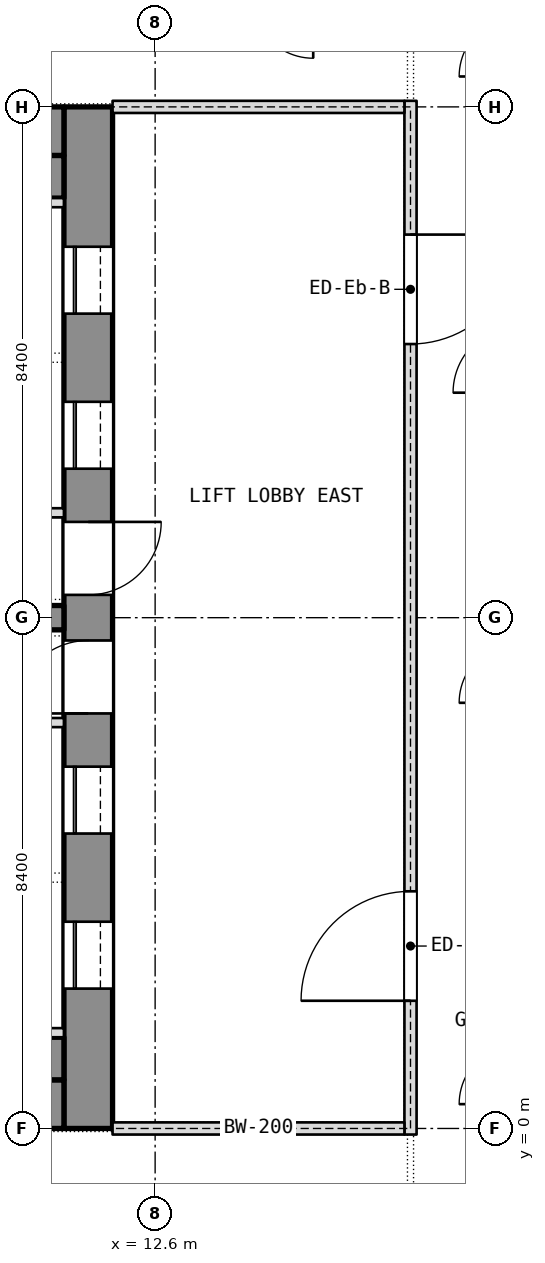
"""IFC4 building model, lengths in metres.
Left out: names, types, materials, properties, quantities, classifications, styles, units other than length and angle.
Written with IfcOpenShell. Run it as: python <this file> out.ifc"""

import sys

from ifc_helpers import new_model, si_unit, direction, frame, frame_2d, origin, place, context, subcontext, project, spatial, rectangle, extrude, element, fill, save


model = new_model("IFC4")
c1 = context("Model", 3, precision=1e-05, world=origin(), true_north=direction((0.0, 1.0)))
c2 = subcontext(c1, "Body", "Model", "MODEL_VIEW")
j1 = project(units=[si_unit("LENGTHUNIT", "METRE"), si_unit("PLANEANGLEUNIT", "RADIAN")], contexts=[c1])
p1 = place(None, origin())
s1 = spatial("IfcSite", under=j1, at=p1, CompositionType="ELEMENT")
p2 = place(p1, origin())
s2 = spatial("IfcBuilding", under=s1, at=p2, CompositionType="ELEMENT")
p3 = place(p2, frame((0.0, 0.0, 248.9)))
s3 = spatial("IfcBuildingStorey", under=s2, at=p3, CompositionType="ELEMENT", Elevation=248.9)
p4 = place(p3, frame((11.5, 0.0, 0.0), z_axis=(0.0, 0.0, 1.0), x_axis=(0.0, 1.0, 0.0)))
e1 = element("IfcWall", 1, at=p4, inside=s3, PredefinedType="SHEAR", context=c2, shape_type="SweptSolid", body=[
    extrude(rectangle(XDim=16.8, YDim=0.8, at=frame_2d((8.4, 0.0))), origin(), (0.0, 0.0, 1.0), 3.6),
])
p5 = place(p4, frame((2.3, 0.0, 0.0)))
e2 = element("IfcOpeningElement", 2, at=p5, cuts=e1, PredefinedType="OPENING", context=c2, shape_type="SweptSolid", body=[
    extrude(rectangle(XDim=1.1, YDim=2.1, at=frame_2d((0.55, 1.05))), frame((0.0, 0.4, 0.0), z_axis=(0.0, -1.0, 0.0), x_axis=(1.0, 0.0, 0.0)), (0.0, 0.0, 1.0), 0.8),
])
p6 = place(p4, frame((4.85, 0.0, 0.0)))
e3 = element("IfcOpeningElement", 3, at=p6, cuts=e1, PredefinedType="OPENING", context=c2, shape_type="SweptSolid", body=[
    extrude(rectangle(XDim=1.1, YDim=2.1, at=frame_2d((0.55, 1.05))), frame((0.0, 0.4, 0.0), z_axis=(0.0, -1.0, 0.0), x_axis=(1.0, 0.0, 0.0)), (0.0, 0.0, 1.0), 0.8),
])
p7 = place(p4, frame((6.825, 0.0, 0.0)))
e4 = element("IfcOpeningElement", 4, at=p7, cuts=e1, PredefinedType="OPENING", context=c2, shape_type="SweptSolid", body=[
    extrude(rectangle(XDim=1.2, YDim=2.1, at=frame_2d((0.6, 1.05))), frame((0.0, 0.4, 0.0), z_axis=(0.0, -1.0, 0.0), x_axis=(1.0, 0.0, 0.0)), (0.0, 0.0, 1.0), 0.8),
])
p8 = place(p4, frame((13.4, 0.0, 0.0)))
e5 = element("IfcOpeningElement", 5, at=p8, cuts=e1, PredefinedType="OPENING", context=c2, shape_type="SweptSolid", body=[
    extrude(rectangle(XDim=1.1, YDim=2.1, at=frame_2d((0.55, 1.05))), frame((0.0, 0.4, 0.0), z_axis=(0.0, -1.0, 0.0), x_axis=(1.0, 0.0, 0.0)), (0.0, 0.0, 1.0), 0.8),
])
p9 = place(p4, frame((10.85, 0.0, 0.0)))
e6 = element("IfcOpeningElement", 6, at=p9, cuts=e1, PredefinedType="OPENING", context=c2, shape_type="SweptSolid", body=[
    extrude(rectangle(XDim=1.1, YDim=2.1, at=frame_2d((0.55, 1.05))), frame((0.0, 0.4, 0.0), z_axis=(0.0, -1.0, 0.0), x_axis=(1.0, 0.0, 0.0)), (0.0, 0.0, 1.0), 0.8),
])
p10 = place(p4, frame((8.775, 0.0, 0.0)))
e7 = element("IfcOpeningElement", 7, at=p10, cuts=e1, PredefinedType="OPENING", context=c2, shape_type="SweptSolid", body=[
    extrude(rectangle(XDim=1.2, YDim=2.1, at=frame_2d((0.6, 1.05))), frame((0.0, 0.4, 0.0), z_axis=(0.0, -1.0, 0.0), x_axis=(1.0, 0.0, 0.0)), (0.0, 0.0, 1.0), 0.8),
])
for number, where, z_axis, x_axis in (
    (8, (-11.1, 0.4, 0.0), (0.0, 0.0, 1.0), (1.0, 0.0, 0.0)),
    (9, (-11.1, 16.4, 0.0), (0.0, 0.0, 1.0), (1.0, 0.0, 0.0)),
):
    element("IfcWall", number, at=place(p3, frame(where, z_axis=z_axis, x_axis=x_axis)), inside=s3, PredefinedType="SHEAR", context=c2, shape_type="SweptSolid", body=[
        extrude(rectangle(XDim=22.2, YDim=0.8, at=frame_2d((11.1, 0.0))), origin(), (0.0, 0.0, 1.0), 3.6),
    ])
p11 = place(p3, frame((4.4, 8.4, 0.0), z_axis=(0.0, 0.0, 1.0), x_axis=(1.0, 0.0, 0.0)))
e10 = element("IfcWall", 10, at=p11, inside=s3, PredefinedType="SHEAR", context=c2, shape_type="SweptSolid", body=[
    extrude(rectangle(XDim=6.7, YDim=0.4, at=frame_2d((3.35, 0.0))), origin(), (0.0, 0.0, 1.0), 3.6),
])
for number, where, z_axis, x_axis in (
    (11, (-11.1, 1.15, 0.0), (0.0, 0.0, 1.0), (1.0, 0.0, 0.0)),
    (12, (-11.1, 15.65, 0.0), (0.0, 0.0, 1.0), (1.0, 0.0, 0.0)),
):
    element("IfcWall", number, at=place(p3, frame(where, z_axis=z_axis, x_axis=x_axis)), inside=s3, PredefinedType="PARTITIONING", context=c2, shape_type="SweptSolid", body=[
        extrude(rectangle(XDim=22.2, YDim=0.7, at=frame_2d((11.1, 0.0))), origin(), (0.0, 0.0, 1.0), 3.3),
    ])
for number, where, z_axis, x_axis in (
    (13, (9.0, 6.675, 0.0), (0.0, 0.0, 1.0), (1.0, 0.0, 0.0)),
    (14, (9.0, 1.575, 0.0), (0.0, 0.0, 1.0), (1.0, 0.0, 0.0)),
    (15, (9.0, 10.125, 0.0), (0.0, 0.0, 1.0), (1.0, 0.0, 0.0)),
    (16, (9.0, 15.225, 0.0), (0.0, 0.0, 1.0), (1.0, 0.0, 0.0)),
):
    element("IfcWall", number, at=place(p3, frame(where, z_axis=z_axis, x_axis=x_axis)), inside=s3, PredefinedType="SHEAR", context=c2, shape_type="SweptSolid", body=[
        extrude(rectangle(XDim=2.1, YDim=0.15, at=frame_2d((1.05, 0.0))), origin(), (0.0, 0.0, 1.0), 3.6),
    ])
p12 = place(p3, frame((16.8, -0.1, 0.0), z_axis=(0.0, 0.0, 1.0), x_axis=(0.0, 1.0, 0.0)))
e17 = element("IfcWall", 17, at=p12, inside=s3, PredefinedType="PARTITIONING", context=c2, shape_type="SweptSolid", body=[
    extrude(rectangle(XDim=17.0, YDim=0.2, at=frame_2d((8.5, 0.0))), origin(), (0.0, 0.0, 1.0), 3.3),
])
p13 = place(p12, frame((2.2, 0.0, 0.0)))
e18 = element("IfcOpeningElement", 18, at=p13, cuts=e17, PredefinedType="OPENING", context=c2, shape_type="SweptSolid", body=[
    extrude(rectangle(XDim=1.8, YDim=2.1, at=frame_2d((0.9, 1.05))), frame((0.0, 0.1, 0.0), z_axis=(0.0, -1.0, 0.0), x_axis=(1.0, 0.0, 0.0)), (0.0, 0.0, 1.0), 0.2),
])
p14 = place(p12, frame((13.0, 0.0, 0.0)))
e19 = element("IfcOpeningElement", 19, at=p14, cuts=e17, PredefinedType="OPENING", context=c2, shape_type="SweptSolid", body=[
    extrude(rectangle(XDim=1.8, YDim=2.1, at=frame_2d((0.9, 1.05))), frame((0.0, 0.1, 0.0), z_axis=(0.0, -1.0, 0.0), x_axis=(1.0, 0.0, 0.0)), (0.0, 0.0, 1.0), 0.2),
])
for number, where, z_axis, x_axis in (
    (20, (11.9, 0.0, 0.0), (0.0, 0.0, 1.0), (1.0, 0.0, 0.0)),
    (21, (11.9, 16.8, 0.0), (0.0, 0.0, 1.0), (1.0, 0.0, 0.0)),
):
    element("IfcWall", number, at=place(p3, frame(where, z_axis=z_axis, x_axis=x_axis)), inside=s3, PredefinedType="PARTITIONING", context=c2, shape_type="SweptSolid", body=[
        extrude(rectangle(XDim=4.8, YDim=0.2, at=frame_2d((2.4, 0.0))), origin(), (0.0, 0.0, 1.0), 2.9),
    ])
p15 = place(p5, origin())
e22 = element("IfcDoor", 22, at=p15, inside=s3, OperationType="SLIDING_TO_LEFT", PredefinedType="DOOR", context=c2, shape_type="SweptSolid", body=[
    extrude(rectangle(XDim=1.1, YDim=2.1, at=frame_2d((0.55, 1.05))), frame((0.0, 0.025, 0.0), z_axis=(0.0, -1.0, 0.0), x_axis=(1.0, 0.0, 0.0)), (0.0, 0.0, 1.0), 0.05),
])
fill(e2, e22)
p16 = place(p6, origin())
e23 = element("IfcDoor", 23, at=p16, inside=s3, OperationType="SLIDING_TO_LEFT", PredefinedType="DOOR", context=c2, shape_type="SweptSolid", body=[
    extrude(rectangle(XDim=1.1, YDim=2.1, at=frame_2d((0.55, 1.05))), frame((0.0, 0.025, 0.0), z_axis=(0.0, -1.0, 0.0), x_axis=(1.0, 0.0, 0.0)), (0.0, 0.0, 1.0), 0.05),
])
fill(e3, e23)
p17 = place(p7, origin())
e24 = element("IfcDoor", 24, at=p17, inside=s3, OperationType="SINGLE_SWING_LEFT", PredefinedType="DOOR", context=c2, shape_type="SweptSolid", body=[
    extrude(rectangle(XDim=1.2, YDim=2.1, at=frame_2d((0.6, 1.05))), frame((0.0, 0.025, 0.0), z_axis=(0.0, -1.0, 0.0), x_axis=(1.0, 0.0, 0.0)), (0.0, 0.0, 1.0), 0.05),
])
fill(e4, e24)
p18 = place(p8, origin())
e25 = element("IfcDoor", 25, at=p18, inside=s3, OperationType="SLIDING_TO_LEFT", PredefinedType="DOOR", context=c2, shape_type="SweptSolid", body=[
    extrude(rectangle(XDim=1.1, YDim=2.1, at=frame_2d((0.55, 1.05))), frame((0.0, 0.025, 0.0), z_axis=(0.0, -1.0, 0.0), x_axis=(1.0, 0.0, 0.0)), (0.0, 0.0, 1.0), 0.05),
])
fill(e5, e25)
p19 = place(p9, origin())
e26 = element("IfcDoor", 26, at=p19, inside=s3, OperationType="SLIDING_TO_LEFT", PredefinedType="DOOR", context=c2, shape_type="SweptSolid", body=[
    extrude(rectangle(XDim=1.1, YDim=2.1, at=frame_2d((0.55, 1.05))), frame((0.0, 0.025, 0.0), z_axis=(0.0, -1.0, 0.0), x_axis=(1.0, 0.0, 0.0)), (0.0, 0.0, 1.0), 0.05),
])
fill(e6, e26)
p20 = place(p10, origin())
e27 = element("IfcDoor", 27, at=p20, inside=s3, OperationType="SINGLE_SWING_LEFT", PredefinedType="DOOR", context=c2, shape_type="SweptSolid", body=[
    extrude(rectangle(XDim=1.2, YDim=2.1, at=frame_2d((0.6, 1.05))), frame((0.0, 0.025, 0.0), z_axis=(0.0, -1.0, 0.0), x_axis=(1.0, 0.0, 0.0)), (0.0, 0.0, 1.0), 0.05),
])
fill(e7, e27)
p21 = place(p13, origin())
e28 = element("IfcDoor", 28, at=p21, inside=s3, OperationType="DOUBLE_DOOR_SINGLE_SWING", PredefinedType="DOOR", context=c2, shape_type="SweptSolid", body=[
    extrude(rectangle(XDim=1.8, YDim=2.1, at=frame_2d((0.9, 1.05))), frame((0.0, 0.025, 0.0), z_axis=(0.0, -1.0, 0.0), x_axis=(1.0, 0.0, 0.0)), (0.0, 0.0, 1.0), 0.05),
])
fill(e18, e28)
p22 = place(p14, origin())
e29 = element("IfcDoor", 29, at=p22, inside=s3, OperationType="DOUBLE_DOOR_SINGLE_SWING", PredefinedType="DOOR", context=c2, shape_type="SweptSolid", body=[
    extrude(rectangle(XDim=1.8, YDim=2.1, at=frame_2d((0.9, 1.05))), frame((0.0, 0.025, 0.0), z_axis=(0.0, -1.0, 0.0), x_axis=(1.0, 0.0, 0.0)), (0.0, 0.0, 1.0), 0.05),
])
fill(e19, e29)
save(model, sys.argv[1])
